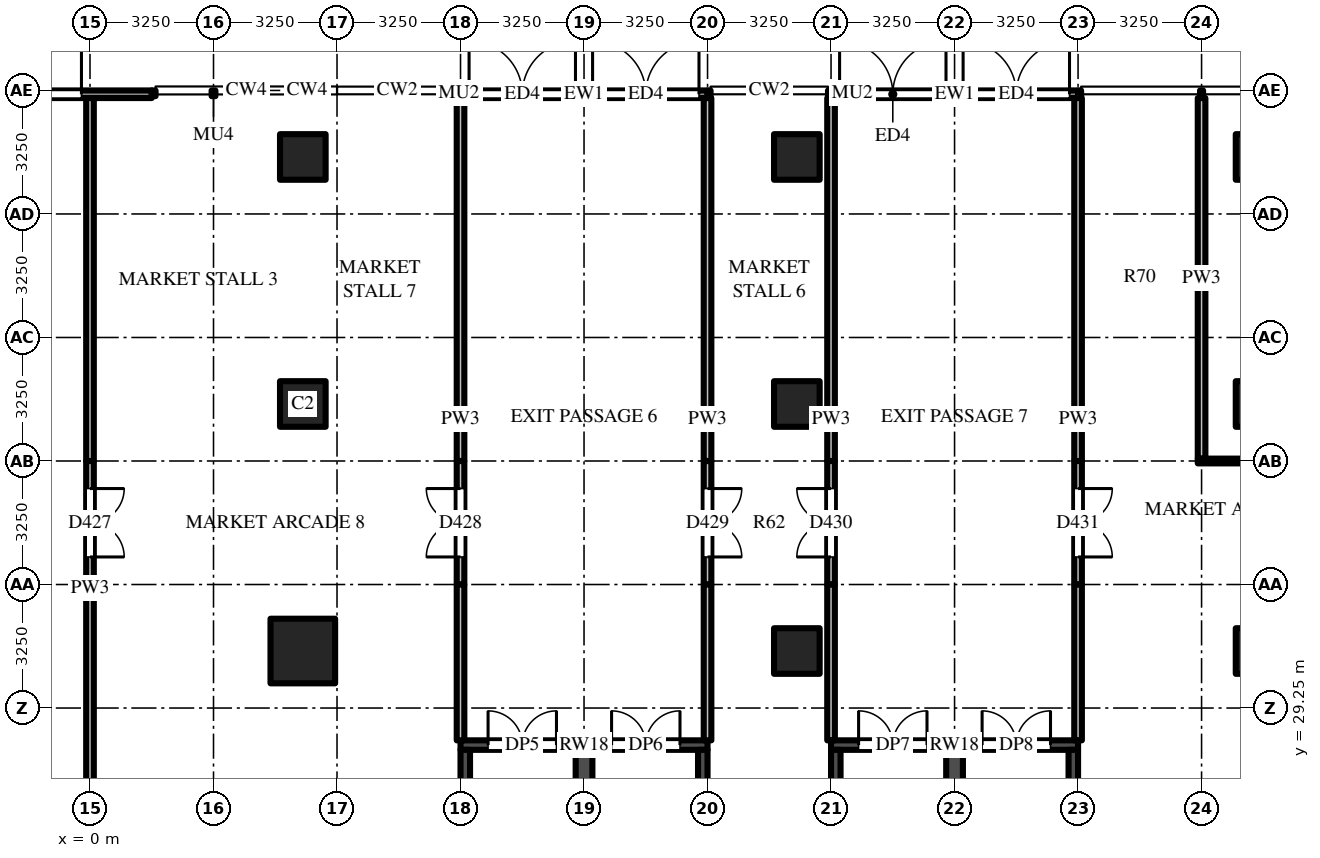
"""IFC4 building model, lengths in metres.
Left out: names, types, materials, properties, quantities, classifications, styles, units other than length and angle.
Written with IfcOpenShell. Run it as: python <this file> out.ifc"""

import sys

from ifc_helpers import new_model, si_unit, direction, frame, frame_2d, origin, origin_2d, place, context, subcontext, project, spatial, rectangle, extrude, source, transform, mapped, element, fill, save


model = new_model("IFC4")
c1 = context("Model", 3, precision=1e-05, world=origin(), true_north=direction((0.0, 1.0)))
c2 = subcontext(c1, "Body", "Model", "MODEL_VIEW")
j1 = project(units=[si_unit("LENGTHUNIT", "METRE"), si_unit("PLANEANGLEUNIT", "RADIAN")], contexts=[c1])
p1 = place(None, origin())
s1 = spatial("IfcSite", under=j1, at=p1, CompositionType="ELEMENT")
p2 = place(p1, origin())
s2 = spatial("IfcBuilding", under=s1, at=p2, CompositionType="ELEMENT")
p3 = place(p2, origin())
s3 = spatial("IfcBuildingStorey", under=s2, at=p3, CompositionType="ELEMENT", Elevation=0.0)
m1 = source(origin(), c2, "Body", "SweptSolid", [
    extrude(rectangle(XDim=1.7, YDim=1.7, at=origin_2d()), origin(), (0.0, 0.0, 1.0), 8.5),
])
p4 = place(p3, frame((5.6, 30.75, -0.5), z_axis=(0.0, 0.0, 1.0), x_axis=(1.0, 0.0, 0.0)))
e1 = element("IfcColumn", 1, at=p4, inside=s3, PredefinedType="COLUMN", context=c2, shape_type="MappedRepresentation", body=[
    mapped(m1, transform((0.0, 0.0, 0.0))),
])
m2 = source(origin(), c2, "Body", "SweptSolid", [
    extrude(rectangle(XDim=1.2, YDim=1.2, at=origin_2d()), origin(), (0.0, 0.0, 1.0), 8.5),
])
for number, where, z_axis, x_axis in (
    (2, (5.6, 37.25, -0.5), (0.0, 0.0, 1.0), (1.0, 0.0, 0.0)),
    (3, (5.6, 43.75, -0.5), (0.0, 0.0, 1.0), (1.0, 0.0, 0.0)),
    (4, (18.6, 30.75, -0.5), (0.0, 0.0, 1.0), (1.0, 0.0, 0.0)),
    (5, (18.6, 37.25, -0.5), (0.0, 0.0, 1.0), (1.0, 0.0, 0.0)),
    (6, (18.6, 43.75, -0.5), (0.0, 0.0, 1.0), (1.0, 0.0, 0.0)),
    (7, (30.75, 30.75, -0.5), (0.0, 0.0, 1.0), (1.0, 0.0, 0.0)),
    (8, (30.75, 37.25, -0.5), (0.0, 0.0, 1.0), (1.0, 0.0, 0.0)),
    (9, (30.75, 43.75, -0.5), (0.0, 0.0, 1.0), (1.0, 0.0, 0.0)),
):
    element("IfcColumn", number, at=place(p3, frame(where, z_axis=z_axis, x_axis=x_axis)), inside=s3, PredefinedType="COLUMN", context=c2, shape_type="MappedRepresentation", body=[
        mapped(m2, transform((0.0, 0.0, 0.0))),
    ])
m3 = source(origin(), c2, "Body", "SweptSolid", [
    extrude(rectangle(XDim=6.5, YDim=0.25, at=frame_2d((3.25, 0.0))), origin(), (0.0, 0.0, 1.0), 7.7),
])
p5 = place(p3, frame((9.75, 28.275, 0.0), z_axis=(0.0, 0.0, 1.0), x_axis=(1.0, 0.0, 0.0)))
e10 = element("IfcWall", 10, at=p5, inside=s3, PredefinedType="SHEAR", context=c2, shape_type="MappedRepresentation", body=[
    mapped(m3, transform((0.0, 0.0, 0.0))),
])
m4 = source(origin(), c2, "Body", "SweptSolid", [
    extrude(rectangle(XDim=1.8, YDim=2.1, at=frame_2d((0.9, 1.05))), frame((0.0, 0.135, 0.0), z_axis=(0.0, -1.0, 0.0), x_axis=(1.0, 0.0, 0.0)), (0.0, 0.0, 1.0), 0.27),
])
p6 = place(p5, frame((0.725, 0.0, 0.0)))
e11 = element("IfcOpeningElement", 11, at=p6, cuts=e10, PredefinedType="OPENING", context=c2, shape_type="MappedRepresentation", body=[
    mapped(m4, transform((0.0, 0.0, 0.0))),
])
p7 = place(p5, frame((3.975, 0.0, 0.0)))
e12 = element("IfcOpeningElement", 12, at=p7, cuts=e10, PredefinedType="OPENING", context=c2, shape_type="MappedRepresentation", body=[
    mapped(m4, transform((0.0, 0.0, 0.0))),
])
m5 = source(origin(), c2, "Body", "SweptSolid", [
    extrude(rectangle(XDim=8.3, YDim=0.25, at=frame_2d((4.15, 0.0))), origin(), (0.0, 0.0, 1.0), 7.7),
])
for number, where, z_axis, x_axis in (
    (13, (9.875, 19.85, 0.0), (0.0, 0.0, 1.0), (0.0, 1.0, 0.0)),
    (14, (16.125, 19.85, 0.0), (0.0, 0.0, 1.0), (0.0, 1.0, 0.0)),
):
    element("IfcWall", number, at=place(p3, frame(where, z_axis=z_axis, x_axis=x_axis)), inside=s3, PredefinedType="SHEAR", context=c2, shape_type="MappedRepresentation", body=[
        mapped(m5, transform((0.0, 0.0, 0.0))),
    ])
m6 = source(origin(), c2, "Body", "SweptSolid", [
    extrude(rectangle(XDim=8.3, YDim=0.44, at=frame_2d((4.15, 0.0))), origin(), (0.0, 0.0, 1.0), 7.7),
])
p8 = place(p3, frame((13.0, 19.85, 0.0), z_axis=(0.0, 0.0, 1.0), x_axis=(0.0, 1.0, 0.0)))
e15 = element("IfcWall", 15, at=p8, inside=s3, PredefinedType="SHEAR", context=c2, shape_type="MappedRepresentation", body=[
    mapped(m6, transform((0.0, 0.0, 0.0))),
])
p9 = place(p3, frame((19.5, 28.275, 0.0), z_axis=(0.0, 0.0, 1.0), x_axis=(1.0, 0.0, 0.0)))
e16 = element("IfcWall", 16, at=p9, inside=s3, PredefinedType="SHEAR", context=c2, shape_type="MappedRepresentation", body=[
    mapped(m3, transform((0.0, 0.0, 0.0))),
])
p10 = place(p9, frame((0.725, 0.0, 0.0)))
e17 = element("IfcOpeningElement", 17, at=p10, cuts=e16, PredefinedType="OPENING", context=c2, shape_type="MappedRepresentation", body=[
    mapped(m4, transform((0.0, 0.0, 0.0))),
])
p11 = place(p9, frame((3.975, 0.0, 0.0)))
e18 = element("IfcOpeningElement", 18, at=p11, cuts=e16, PredefinedType="OPENING", context=c2, shape_type="MappedRepresentation", body=[
    mapped(m4, transform((0.0, 0.0, 0.0))),
])
for number, where, z_axis, x_axis in (
    (19, (19.625, 19.85, 0.0), (0.0, 0.0, 1.0), (0.0, 1.0, 0.0)),
    (20, (25.875, 19.85, 0.0), (0.0, 0.0, 1.0), (0.0, 1.0, 0.0)),
):
    element("IfcWall", number, at=place(p3, frame(where, z_axis=z_axis, x_axis=x_axis)), inside=s3, PredefinedType="SHEAR", context=c2, shape_type="MappedRepresentation", body=[
        mapped(m5, transform((0.0, 0.0, 0.0))),
    ])
p12 = place(p3, frame((22.75, 19.85, 0.0), z_axis=(0.0, 0.0, 1.0), x_axis=(0.0, 1.0, 0.0)))
e21 = element("IfcWall", 21, at=p12, inside=s3, PredefinedType="SHEAR", context=c2, shape_type="MappedRepresentation", body=[
    mapped(m6, transform((0.0, 0.0, 0.0))),
])
m7 = source(origin(), c2, "Body", "SweptSolid", [
    extrude(rectangle(XDim=3.25, YDim=0.2, at=frame_2d((1.625, 0.0))), origin(), (0.0, 0.0, 1.0), 7.7),
])
p13 = place(p3, frame((22.75, 45.4, 0.0), z_axis=(0.0, 0.0, 1.0), x_axis=(1.0, 0.0, 0.0)))
e22 = element("IfcWall", 22, at=p13, inside=s3, PredefinedType="SOLIDWALL", context=c2, shape_type="MappedRepresentation", body=[
    mapped(m7, transform((0.0, 0.0, 0.0))),
])
m8 = source(origin(), c2, "Body", "SweptSolid", [
    extrude(rectangle(XDim=2.8, YDim=2.4, at=frame_2d((1.4, 1.2))), frame((0.0, 0.11, 0.0), z_axis=(0.0, -1.0, 0.0), x_axis=(1.0, 0.0, 0.0)), (0.0, 0.0, 1.0), 0.22),
])
p14 = place(p13, frame((0.225, 0.0, 0.0)))
e23 = element("IfcOpeningElement", 23, at=p14, cuts=e22, PredefinedType="OPENING", context=c2, shape_type="MappedRepresentation", body=[
    mapped(m8, transform((0.0, 0.0, 0.0))),
])
p15 = place(p3, frame((19.5, 45.4, 0.0), z_axis=(0.0, 0.0, 1.0), x_axis=(1.0, 0.0, 0.0)))
e24 = element("IfcWall", 24, at=p15, inside=s3, PredefinedType="SOLIDWALL", context=c2, shape_type="MappedRepresentation", body=[
    mapped(m7, transform((0.0, 0.0, 0.0))),
])
p16 = place(p15, frame((0.225, 0.0, 0.0)))
e25 = element("IfcOpeningElement", 25, at=p16, cuts=e24, PredefinedType="OPENING", context=c2, shape_type="MappedRepresentation", body=[
    mapped(m8, transform((0.0, 0.0, 0.0))),
])
p17 = place(p3, frame((13.0, 45.4, 0.0), z_axis=(0.0, 0.0, 1.0), x_axis=(1.0, 0.0, 0.0)))
e26 = element("IfcWall", 26, at=p17, inside=s3, PredefinedType="SOLIDWALL", context=c2, shape_type="MappedRepresentation", body=[
    mapped(m7, transform((0.0, 0.0, 0.0))),
])
p18 = place(p17, frame((0.225, 0.0, 0.0)))
e27 = element("IfcOpeningElement", 27, at=p18, cuts=e26, PredefinedType="OPENING", context=c2, shape_type="MappedRepresentation", body=[
    mapped(m8, transform((0.0, 0.0, 0.0))),
])
p19 = place(p3, frame((9.75, 45.4, 0.0), z_axis=(0.0, 0.0, 1.0), x_axis=(1.0, 0.0, 0.0)))
e28 = element("IfcWall", 28, at=p19, inside=s3, PredefinedType="SOLIDWALL", context=c2, shape_type="MappedRepresentation", body=[
    mapped(m7, transform((0.0, 0.0, 0.0))),
])
p20 = place(p19, frame((0.225, 0.0, 0.0)))
e29 = element("IfcOpeningElement", 29, at=p20, cuts=e28, PredefinedType="OPENING", context=c2, shape_type="MappedRepresentation", body=[
    mapped(m8, transform((0.0, 0.0, 0.0))),
])
m9 = source(origin(), c2, "Body", "SweptSolid", [
    extrude(rectangle(XDim=6.5, YDim=0.2, at=frame_2d((3.25, 0.0))), origin(), (0.0, 0.0, 1.0), 7.7),
])
p21 = place(p3, frame((-4.875, 45.4, 0.0), z_axis=(0.0, 0.0, 1.0), x_axis=(1.0, 0.0, 0.0)))
e30 = element("IfcWall", 30, at=p21, inside=s3, PredefinedType="SOLIDWALL", context=c2, shape_type="MappedRepresentation", body=[
    mapped(m9, transform((0.0, 0.0, 0.0))),
])
m10 = source(origin(), c2, "Body", "SweptSolid", [
    extrude(rectangle(XDim=2.8, YDim=2.6, at=frame_2d((1.4, 1.3))), frame((0.0, 0.11, 0.0), z_axis=(0.0, -1.0, 0.0), x_axis=(1.0, 0.0, 0.0)), (0.0, 0.0, 1.0), 0.22),
])
p22 = place(p21, frame((1.85, 0.0, 0.0)))
e31 = element("IfcOpeningElement", 31, at=p22, cuts=e30, PredefinedType="OPENING", context=c2, shape_type="MappedRepresentation", body=[
    mapped(m10, transform((0.0, 0.0, 0.0))),
])
m11 = source(origin(), c2, "Body", "SweptSolid", [
    extrude(rectangle(XDim=3.25, YDim=0.2, at=frame_2d((1.625, 0.0))), origin(), (0.0, 0.0, 1.0), 6.997),
])
p23 = place(p3, frame((0.0, 35.75, 0.0), z_axis=(0.0, 0.0, 1.0), x_axis=(0.0, -1.0, 0.0)))
e32 = element("IfcWall", 32, at=p23, inside=s3, PredefinedType="PARTITIONING", context=c2, shape_type="MappedRepresentation", body=[
    mapped(m11, transform((0.0, 0.0, 0.0))),
])
m12 = source(origin(), c2, "Body", "SweptSolid", [
    extrude(rectangle(XDim=1.8, YDim=2.1, at=frame_2d((0.9, 1.05))), frame((0.0, 0.11, 0.0), z_axis=(0.0, -1.0, 0.0), x_axis=(1.0, 0.0, 0.0)), (0.0, 0.0, 1.0), 0.22),
])
p24 = place(p23, frame((0.725, 0.0, 0.0)))
e33 = element("IfcOpeningElement", 33, at=p24, cuts=e32, PredefinedType="OPENING", context=c2, shape_type="MappedRepresentation", body=[
    mapped(m12, transform((0.0, 0.0, 0.0))),
])
m13 = source(origin(), c2, "Body", "SweptSolid", [
    extrude(rectangle(XDim=9.55, YDim=0.2, at=frame_2d((4.775, 0.0))), origin(), (0.0, 0.0, 1.0), 6.918),
])
p25 = place(p3, frame((0.0, 45.3, 0.0), z_axis=(0.0, 0.0, 1.0), x_axis=(0.0, -1.0, 0.0)))
e34 = element("IfcWall", 34, at=p25, inside=s3, PredefinedType="PARTITIONING", context=c2, shape_type="MappedRepresentation", body=[
    mapped(m13, transform((0.0, 0.0, 0.0))),
])
m14 = source(origin(), c2, "Body", "SweptSolid", [
    extrude(rectangle(XDim=13.0, YDim=0.2, at=frame_2d((6.5, 0.0))), origin(), (0.0, 0.0, 1.0), 6.918),
])
p26 = place(p3, frame((0.0, 19.5, 0.0), z_axis=(0.0, 0.0, 1.0), x_axis=(0.0, 1.0, 0.0)))
e35 = element("IfcWall", 35, at=p26, inside=s3, PredefinedType="PARTITIONING", context=c2, shape_type="MappedRepresentation", body=[
    mapped(m14, transform((0.0, 0.0, 0.0))),
])
p27 = place(p3, frame((9.75, 32.5, 0.0), z_axis=(0.0, 0.0, 1.0), x_axis=(0.0, 1.0, 0.0)))
e36 = element("IfcWall", 36, at=p27, inside=s3, PredefinedType="PARTITIONING", context=c2, shape_type="MappedRepresentation", body=[
    mapped(m11, transform((0.0, 0.0, 0.0))),
])
p28 = place(p27, frame((0.725, 0.0, 0.0)))
e37 = element("IfcOpeningElement", 37, at=p28, cuts=e36, PredefinedType="OPENING", context=c2, shape_type="MappedRepresentation", body=[
    mapped(m12, transform((0.0, 0.0, 0.0))),
])
m15 = source(origin(), c2, "Body", "SweptSolid", [
    extrude(rectangle(XDim=4.1, YDim=0.2, at=frame_2d((2.05, 0.0))), origin(), (0.0, 0.0, 1.0), 6.762),
])
p29 = place(p3, frame((9.75, 28.4, 0.0), z_axis=(0.0, 0.0, 1.0), x_axis=(0.0, 1.0, 0.0)))
e38 = element("IfcWall", 38, at=p29, inside=s3, PredefinedType="PARTITIONING", context=c2, shape_type="MappedRepresentation", body=[
    mapped(m15, transform((0.0, 0.0, 0.0))),
])
m16 = source(origin(), c2, "Body", "SweptSolid", [
    extrude(rectangle(XDim=9.55, YDim=0.2, at=frame_2d((4.775, 0.0))), origin(), (0.0, 0.0, 1.0), 6.762),
])
p30 = place(p3, frame((9.75, 35.75, 0.0), z_axis=(0.0, 0.0, 1.0), x_axis=(0.0, 1.0, 0.0)))
e39 = element("IfcWall", 39, at=p30, inside=s3, PredefinedType="PARTITIONING", context=c2, shape_type="MappedRepresentation", body=[
    mapped(m16, transform((0.0, 0.0, 0.0))),
])
p31 = place(p3, frame((16.25, 35.75, 0.0), z_axis=(0.0, 0.0, 1.0), x_axis=(0.0, -1.0, 0.0)))
e40 = element("IfcWall", 40, at=p31, inside=s3, PredefinedType="PARTITIONING", context=c2, shape_type="MappedRepresentation", body=[
    mapped(m11, transform((0.0, 0.0, 0.0))),
])
p32 = place(p31, frame((0.725, 0.0, 0.0)))
e41 = element("IfcOpeningElement", 41, at=p32, cuts=e40, PredefinedType="OPENING", context=c2, shape_type="MappedRepresentation", body=[
    mapped(m12, transform((0.0, 0.0, 0.0))),
])
p33 = place(p3, frame((16.25, 45.3, 0.0), z_axis=(0.0, 0.0, 1.0), x_axis=(0.0, -1.0, 0.0)))
e42 = element("IfcWall", 42, at=p33, inside=s3, PredefinedType="PARTITIONING", context=c2, shape_type="MappedRepresentation", body=[
    mapped(m16, transform((0.0, 0.0, 0.0))),
])
p34 = place(p3, frame((16.25, 28.4, 0.0), z_axis=(0.0, 0.0, 1.0), x_axis=(0.0, 1.0, 0.0)))
e43 = element("IfcWall", 43, at=p34, inside=s3, PredefinedType="PARTITIONING", context=c2, shape_type="MappedRepresentation", body=[
    mapped(m15, transform((0.0, 0.0, 0.0))),
])
p35 = place(p3, frame((19.5, 32.5, 0.0), z_axis=(0.0, 0.0, 1.0), x_axis=(0.0, 1.0, 0.0)))
e44 = element("IfcWall", 44, at=p35, inside=s3, PredefinedType="PARTITIONING", context=c2, shape_type="MappedRepresentation", body=[
    mapped(m11, transform((0.0, 0.0, 0.0))),
])
p36 = place(p35, frame((0.725, 0.0, 0.0)))
e45 = element("IfcOpeningElement", 45, at=p36, cuts=e44, PredefinedType="OPENING", context=c2, shape_type="MappedRepresentation", body=[
    mapped(m12, transform((0.0, 0.0, 0.0))),
])
m17 = source(origin(), c2, "Body", "SweptSolid", [
    extrude(rectangle(XDim=4.1, YDim=0.2, at=frame_2d((2.05, 0.0))), origin(), (0.0, 0.0, 1.0), 6.839),
])
p37 = place(p3, frame((19.5, 28.4, 0.0), z_axis=(0.0, 0.0, 1.0), x_axis=(0.0, 1.0, 0.0)))
e46 = element("IfcWall", 46, at=p37, inside=s3, PredefinedType="PARTITIONING", context=c2, shape_type="MappedRepresentation", body=[
    mapped(m17, transform((0.0, 0.0, 0.0))),
])
m18 = source(origin(), c2, "Body", "SweptSolid", [
    extrude(rectangle(XDim=9.55, YDim=0.2, at=frame_2d((4.775, 0.0))), origin(), (0.0, 0.0, 1.0), 6.839),
])
p38 = place(p3, frame((19.5, 35.75, 0.0), z_axis=(0.0, 0.0, 1.0), x_axis=(0.0, 1.0, 0.0)))
e47 = element("IfcWall", 47, at=p38, inside=s3, PredefinedType="PARTITIONING", context=c2, shape_type="MappedRepresentation", body=[
    mapped(m18, transform((0.0, 0.0, 0.0))),
])
p39 = place(p3, frame((26.0, 35.75, 0.0), z_axis=(0.0, 0.0, 1.0), x_axis=(0.0, -1.0, 0.0)))
e48 = element("IfcWall", 48, at=p39, inside=s3, PredefinedType="PARTITIONING", context=c2, shape_type="MappedRepresentation", body=[
    mapped(m11, transform((0.0, 0.0, 0.0))),
])
p40 = place(p39, frame((0.725, 0.0, 0.0)))
e49 = element("IfcOpeningElement", 49, at=p40, cuts=e48, PredefinedType="OPENING", context=c2, shape_type="MappedRepresentation", body=[
    mapped(m12, transform((0.0, 0.0, 0.0))),
])
p41 = place(p3, frame((26.0, 45.3, 0.0), z_axis=(0.0, 0.0, 1.0), x_axis=(0.0, -1.0, 0.0)))
e50 = element("IfcWall", 50, at=p41, inside=s3, PredefinedType="PARTITIONING", context=c2, shape_type="MappedRepresentation", body=[
    mapped(m18, transform((0.0, 0.0, 0.0))),
])
p42 = place(p3, frame((26.0, 28.4, 0.0), z_axis=(0.0, 0.0, 1.0), x_axis=(0.0, 1.0, 0.0)))
e51 = element("IfcWall", 51, at=p42, inside=s3, PredefinedType="PARTITIONING", context=c2, shape_type="MappedRepresentation", body=[
    mapped(m17, transform((0.0, 0.0, 0.0))),
])
m19 = source(origin(), c2, "Body", "SweptSolid", [
    extrude(rectangle(XDim=9.488, YDim=0.2, at=frame_2d((4.744, 0.0))), origin(), (0.0, 0.0, 1.0), 6.839),
])
p43 = place(p3, frame((29.25, 35.812, 0.0), z_axis=(0.0, 0.0, 1.0), x_axis=(0.0, 1.0, 0.0)))
e52 = element("IfcWall", 52, at=p43, inside=s3, PredefinedType="PARTITIONING", context=c2, shape_type="MappedRepresentation", body=[
    mapped(m19, transform((0.0, 0.0, 0.0))),
])
p44 = place(p3, frame((29.15, 35.75, 0.0), z_axis=(0.0, 0.0, 1.0), x_axis=(1.0, 0.0, 0.0)))
e53 = element("IfcWall", 53, at=p44, inside=s3, PredefinedType="PARTITIONING", context=c2, shape_type="SweptSolid", body=[
    extrude(rectangle(XDim=6.6, YDim=0.125, at=frame_2d((3.3, 0.0))), origin(), (0.0, 0.0, 1.0), 6.997),
])
m20 = source(origin(), c2, "Body", "SweptSolid", [
    extrude(rectangle(XDim=1.0, YDim=2.1, at=frame_2d((0.5, 1.05))), frame((0.0, 0.073, 0.0), z_axis=(0.0, -1.0, 0.0), x_axis=(1.0, 0.0, 0.0)), (0.0, 0.0, 1.0), 0.145),
])
p45 = place(p44, frame((2.25, 0.0, 0.0)))
e54 = element("IfcOpeningElement", 54, at=p45, cuts=e53, PredefinedType="OPENING", context=c2, shape_type="MappedRepresentation", body=[
    mapped(m20, transform((0.0, 0.0, 0.0))),
])
m21 = source(origin(), c2, "Body", "SweptSolid", [
    extrude(rectangle(XDim=1.8, YDim=2.1, at=frame_2d((0.9, 1.05))), frame((0.0, 0.025, 0.0), z_axis=(0.0, -1.0, 0.0), x_axis=(1.0, 0.0, 0.0)), (0.0, 0.0, 1.0), 0.05),
])
p46 = place(p6, origin())
e55 = element("IfcDoor", 55, at=p46, inside=s3, OperationType="DOUBLE_DOOR_SINGLE_SWING", PredefinedType="DOOR", context=c2, shape_type="MappedRepresentation", body=[
    mapped(m21, transform((0.0, 0.0, 0.0))),
])
fill(e11, e55)
p47 = place(p7, origin())
e56 = element("IfcDoor", 56, at=p47, inside=s3, OperationType="DOUBLE_DOOR_SINGLE_SWING", PredefinedType="DOOR", context=c2, shape_type="MappedRepresentation", body=[
    mapped(m21, transform((0.0, 0.0, 0.0))),
])
fill(e12, e56)
p48 = place(p10, origin())
e57 = element("IfcDoor", 57, at=p48, inside=s3, OperationType="DOUBLE_DOOR_SINGLE_SWING", PredefinedType="DOOR", context=c2, shape_type="MappedRepresentation", body=[
    mapped(m21, transform((0.0, 0.0, 0.0))),
])
fill(e17, e57)
p49 = place(p11, origin())
e58 = element("IfcDoor", 58, at=p49, inside=s3, OperationType="DOUBLE_DOOR_SINGLE_SWING", PredefinedType="DOOR", context=c2, shape_type="MappedRepresentation", body=[
    mapped(m21, transform((0.0, 0.0, 0.0))),
])
fill(e18, e58)
m22 = source(origin(), c2, "Body", "SweptSolid", [
    extrude(rectangle(XDim=2.8, YDim=2.4, at=frame_2d((1.4, 1.2))), frame((0.0, 0.025, 0.0), z_axis=(0.0, -1.0, 0.0), x_axis=(1.0, 0.0, 0.0)), (0.0, 0.0, 1.0), 0.05),
])
p50 = place(p14, origin())
e59 = element("IfcDoor", 59, at=p50, inside=s3, OperationType="DOUBLE_DOOR_SINGLE_SWING", PredefinedType="DOOR", context=c2, shape_type="MappedRepresentation", body=[
    mapped(m22, transform((0.0, 0.0, 0.0))),
])
fill(e23, e59)
p51 = place(p16, origin())
e60 = element("IfcDoor", 60, at=p51, inside=s3, OperationType="DOUBLE_DOOR_SINGLE_SWING", PredefinedType="DOOR", context=c2, shape_type="MappedRepresentation", body=[
    mapped(m22, transform((0.0, 0.0, 0.0))),
])
fill(e25, e60)
p52 = place(p18, origin())
e61 = element("IfcDoor", 61, at=p52, inside=s3, OperationType="DOUBLE_DOOR_SINGLE_SWING", PredefinedType="DOOR", context=c2, shape_type="MappedRepresentation", body=[
    mapped(m22, transform((0.0, 0.0, 0.0))),
])
fill(e27, e61)
p53 = place(p20, origin())
e62 = element("IfcDoor", 62, at=p53, inside=s3, OperationType="DOUBLE_DOOR_SINGLE_SWING", PredefinedType="DOOR", context=c2, shape_type="MappedRepresentation", body=[
    mapped(m22, transform((0.0, 0.0, 0.0))),
])
fill(e29, e62)
m23 = source(origin(), c2, "Body", "SweptSolid", [
    extrude(rectangle(XDim=2.8, YDim=2.6, at=frame_2d((1.4, 1.3))), frame((0.0, 0.025, 0.0), z_axis=(0.0, -1.0, 0.0), x_axis=(1.0, 0.0, 0.0)), (0.0, 0.0, 1.0), 0.05),
])
p54 = place(p22, origin())
e63 = element("IfcDoor", 63, at=p54, inside=s3, OperationType="DOUBLE_DOOR_SINGLE_SWING", PredefinedType="DOOR", context=c2, shape_type="MappedRepresentation", body=[
    mapped(m23, transform((0.0, 0.0, 0.0))),
])
fill(e31, e63)
p55 = place(p24, origin())
e64 = element("IfcDoor", 64, at=p55, inside=s3, OperationType="DOUBLE_DOOR_SINGLE_SWING", PredefinedType="DOOR", context=c2, shape_type="MappedRepresentation", body=[
    mapped(m21, transform((0.0, 0.0, 0.0))),
])
fill(e33, e64)
p56 = place(p28, origin())
e65 = element("IfcDoor", 65, at=p56, inside=s3, OperationType="DOUBLE_DOOR_SINGLE_SWING", PredefinedType="DOOR", context=c2, shape_type="MappedRepresentation", body=[
    mapped(m21, transform((0.0, 0.0, 0.0))),
])
fill(e37, e65)
p57 = place(p32, origin())
e66 = element("IfcDoor", 66, at=p57, inside=s3, OperationType="DOUBLE_DOOR_SINGLE_SWING", PredefinedType="DOOR", context=c2, shape_type="MappedRepresentation", body=[
    mapped(m21, transform((0.0, 0.0, 0.0))),
])
fill(e41, e66)
p58 = place(p36, origin())
e67 = element("IfcDoor", 67, at=p58, inside=s3, OperationType="DOUBLE_DOOR_SINGLE_SWING", PredefinedType="DOOR", context=c2, shape_type="MappedRepresentation", body=[
    mapped(m21, transform((0.0, 0.0, 0.0))),
])
fill(e45, e67)
p59 = place(p40, origin())
e68 = element("IfcDoor", 68, at=p59, inside=s3, OperationType="DOUBLE_DOOR_SINGLE_SWING", PredefinedType="DOOR", context=c2, shape_type="MappedRepresentation", body=[
    mapped(m21, transform((0.0, 0.0, 0.0))),
])
fill(e49, e68)
save(model, sys.argv[1])
